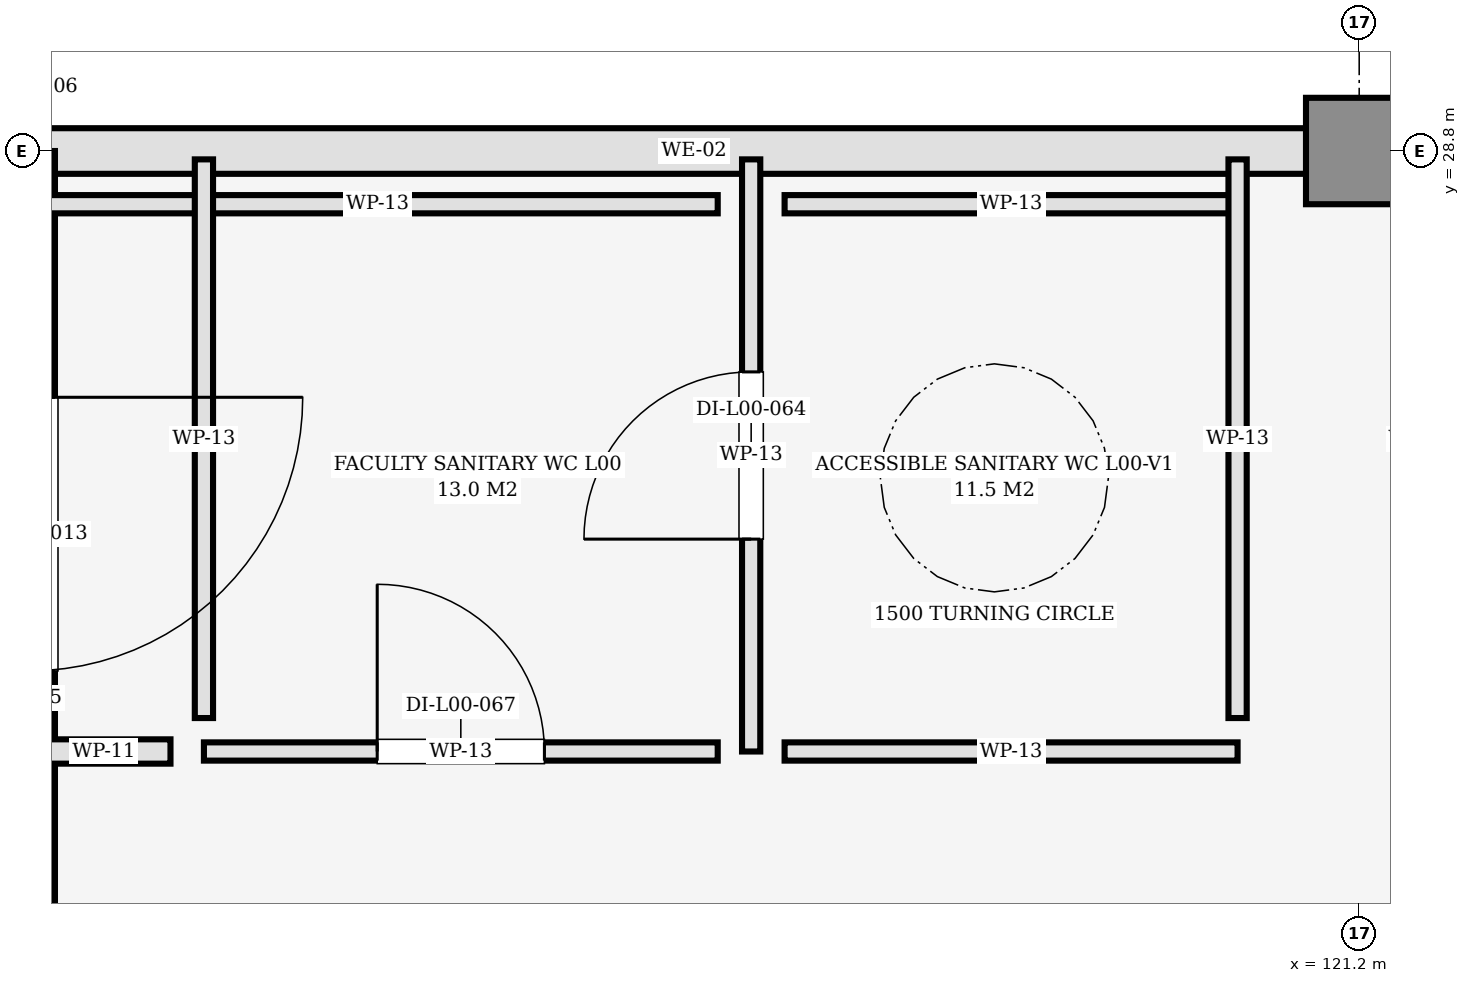
"""IFC4 building model, lengths in metres.
Left out: names, types, materials, properties, quantities, classifications, styles, units other than length and angle.
Written with IfcOpenShell. Run it as: python <this file> out.ifc"""

import sys

from ifc_helpers import new_model, si_unit, direction, frame, frame_2d, origin, origin_2d, place, context, subcontext, project, spatial, rectangle, extrude, element, fill, save


model = new_model("IFC4")
c1 = context("Model", 3, precision=1e-05, world=origin(), true_north=direction((0.0, 1.0)))
c2 = subcontext(c1, "Body", "Model", "MODEL_VIEW")
j1 = project(units=[si_unit("LENGTHUNIT", "METRE"), si_unit("PLANEANGLEUNIT", "RADIAN")], contexts=[c1])
p1 = place(None, origin())
s1 = spatial("IfcSite", under=j1, at=p1, CompositionType="ELEMENT")
p2 = place(p1, origin())
s2 = spatial("IfcBuilding", under=s1, at=p2, CompositionType="ELEMENT")
p3 = place(p2, origin())
s3 = spatial("IfcBuildingStorey", under=s2, at=p3, CompositionType="ELEMENT", Elevation=0.0)
p4 = place(p3, frame((121.2, 28.8, 0.0), z_axis=(0.0, 0.0, 1.0), x_axis=(1.0, 0.0, 0.0)))
e1 = element("IfcColumn", 1, at=p4, inside=s3, PredefinedType="COLUMN", context=c2, shape_type="SweptSolid", body=[
    extrude(rectangle(XDim=0.7, YDim=0.7, at=origin_2d()), origin(), (0.0, 0.0, 1.0), 4.8),
])
p5 = place(p3, frame((130.2, 28.8, 0.0), z_axis=(0.0, 0.0, 1.0), x_axis=(-1.0, 0.0, 0.0)))
e2 = element("IfcWall", 2, at=p5, inside=s3, PredefinedType="SOLIDWALL", context=c2, shape_type="SweptSolid", body=[
    extrude(rectangle(XDim=9.0, YDim=0.34, at=frame_2d((4.5, 0.0))), origin(), (0.0, 0.0, 1.0), 3.705),
])
p6 = place(p5, frame((3.5, 0.0, 0.0)))
e3 = element("IfcOpeningElement", 3, at=p6, cuts=e2, PredefinedType="OPENING", context=c2, shape_type="SweptSolid", body=[
    extrude(rectangle(XDim=2.0, YDim=2.3, at=frame_2d((1.0, 1.15))), frame((0.0, 0.18, 0.0), z_axis=(0.0, -1.0, 0.0), x_axis=(1.0, 0.0, 0.0)), (0.0, 0.0, 1.0), 0.36),
])
p7 = place(p3, frame((121.2, 28.8, 0.0), z_axis=(0.0, 0.0, 1.0), x_axis=(-1.0, 0.0, 0.0)))
e4 = element("IfcWall", 4, at=p7, inside=s3, PredefinedType="SOLIDWALL", context=c2, shape_type="SweptSolid", body=[
    extrude(rectangle(XDim=8.75, YDim=0.3, at=frame_2d((4.375, 0.0))), origin(), (0.0, 0.0, 1.0), 3.705),
])
p8 = place(p7, frame((2.292, 0.0, 0.9)))
e5 = element("IfcOpeningElement", 5, at=p8, cuts=e4, PredefinedType="OPENING", context=c2, shape_type="SweptSolid", body=[
    extrude(rectangle(XDim=1.25, YDim=1.5, at=frame_2d((0.625, 0.75))), frame((0.0, 0.16, 0.0), z_axis=(0.0, -1.0, 0.0), x_axis=(1.0, 0.0, 0.0)), (0.0, 0.0, 1.0), 0.32),
])
p9 = place(p7, frame((5.208, 0.0, 0.9)))
e6 = element("IfcOpeningElement", 6, at=p9, cuts=e4, PredefinedType="OPENING", context=c2, shape_type="SweptSolid", body=[
    extrude(rectangle(XDim=1.25, YDim=1.5, at=frame_2d((0.625, 0.75))), frame((0.0, 0.16, 0.0), z_axis=(0.0, -1.0, 0.0), x_axis=(1.0, 0.0, 0.0)), (0.0, 0.0, 1.0), 0.32),
])
p10 = place(p3, frame((112.45, 28.8, 0.0), z_axis=(0.0, 0.0, 1.0), x_axis=(0.0, -1.0, 0.0)))
e7 = element("IfcWall", 7, at=p10, inside=s3, PredefinedType="SOLIDWALL", context=c2, shape_type="SweptSolid", body=[
    extrude(rectangle(XDim=7.2, YDim=0.34, at=frame_2d((3.6, 0.0))), origin(), (0.0, 0.0, 1.0), 3.705),
])
p11 = place(p10, frame((1.62, 0.0, 0.0)))
e8 = element("IfcOpeningElement", 8, at=p11, cuts=e7, PredefinedType="OPENING", context=c2, shape_type="SweptSolid", body=[
    extrude(rectangle(XDim=1.8, YDim=2.2, at=frame_2d((0.9, 1.1))), frame((0.0, 0.18, 0.0), z_axis=(0.0, -1.0, 0.0), x_axis=(1.0, 0.0, 0.0)), (0.0, 0.0, 1.0), 0.36),
])
p12 = place(p3, frame((117.2, 24.85, 0.0), z_axis=(0.0, 0.0, 1.0), x_axis=(0.0, 1.0, 0.0)))
e9 = element("IfcWall", 9, at=p12, inside=s3, PredefinedType="PARTITIONING", context=c2, shape_type="SweptSolid", body=[
    extrude(rectangle(XDim=3.895, YDim=0.12, at=frame_2d((1.948, 0.0))), origin(), (0.0, 0.0, 1.0), 3.705),
])
p13 = place(p12, frame((1.397, 0.0, 0.0)))
e10 = element("IfcOpeningElement", 10, at=p13, cuts=e9, PredefinedType="OPENING", context=c2, shape_type="SweptSolid", body=[
    extrude(rectangle(XDim=1.1, YDim=2.15, at=frame_2d((0.55, 1.075))), frame((0.0, 0.07, 0.0), z_axis=(0.0, -1.0, 0.0), x_axis=(1.0, 0.0, 0.0)), (0.0, 0.0, 1.0), 0.14),
])
for number, where, z_axis, x_axis in (
    (11, (117.42, 24.85, 0.0), (0.0, 0.0, 1.0), (1.0, 0.0, 0.0)),
    (12, (117.42, 28.45, 0.0), (0.0, 0.0, 1.0), (1.0, 0.0, 0.0)),
):
    element("IfcWall", number, at=place(p3, frame(where, z_axis=z_axis, x_axis=x_axis)), inside=s3, PredefinedType="PARTITIONING", context=c2, shape_type="SweptSolid", body=[
        extrude(rectangle(XDim=2.98, YDim=0.12, at=frame_2d((1.49, 0.0))), origin(), (0.0, 0.0, 1.0), 4.52),
    ])
p14 = place(p3, frame((120.4, 25.07, 0.0), z_axis=(0.0, 0.0, 1.0), x_axis=(0.0, 1.0, 0.0)))
e13 = element("IfcWall", 13, at=p14, inside=s3, PredefinedType="PARTITIONING", context=c2, shape_type="SweptSolid", body=[
    extrude(rectangle(XDim=3.675, YDim=0.12, at=frame_2d((1.837, 0.0))), origin(), (0.0, 0.0, 1.0), 3.705),
])
p15 = place(p3, frame((112.505, 28.45, 0.0), z_axis=(0.0, 0.0, 1.0), x_axis=(1.0, 0.0, 0.0)))
e14 = element("IfcWall", 14, at=p15, inside=s3, PredefinedType="PARTITIONING", context=c2, shape_type="SweptSolid", body=[
    extrude(rectangle(XDim=4.475, YDim=0.12, at=frame_2d((2.238, 0.0))), origin(), (0.0, 0.0, 1.0), 4.52),
])
p16 = place(p3, frame((113.6, 24.85, 0.0), z_axis=(0.0, 0.0, 1.0), x_axis=(1.0, 0.0, 0.0)))
e15 = element("IfcWall", 15, at=p16, inside=s3, PredefinedType="PARTITIONING", context=c2, shape_type="SweptSolid", body=[
    extrude(rectangle(XDim=3.38, YDim=0.12, at=frame_2d((1.69, 0.0))), origin(), (0.0, 0.0, 1.0), 4.52),
])
p17 = place(p16, frame((1.14, 0.0, 0.0)))
e16 = element("IfcOpeningElement", 16, at=p17, cuts=e15, PredefinedType="OPENING", context=c2, shape_type="SweptSolid", body=[
    extrude(rectangle(XDim=1.1, YDim=2.15, at=frame_2d((0.55, 1.075))), frame((0.0, 0.07, 0.0), z_axis=(0.0, -1.0, 0.0), x_axis=(1.0, 0.0, 0.0)), (0.0, 0.0, 1.0), 0.14),
])
p18 = place(p3, frame((113.6, 25.07, 0.0), z_axis=(0.0, 0.0, 1.0), x_axis=(0.0, 1.0, 0.0)))
e17 = element("IfcWall", 17, at=p18, inside=s3, PredefinedType="PARTITIONING", context=c2, shape_type="SweptSolid", body=[
    extrude(rectangle(XDim=3.675, YDim=0.12, at=frame_2d((1.837, 0.0))), origin(), (0.0, 0.0, 1.0), 3.705),
])
p19 = place(p3, frame((112.505, 24.85, 0.0), z_axis=(0.0, 0.0, 1.0), x_axis=(1.0, 0.0, 0.0)))
e18 = element("IfcWall", 18, at=p19, inside=s3, PredefinedType="PARTITIONING", context=c2, shape_type="SweptSolid", body=[
    extrude(rectangle(XDim=0.875, YDim=0.16, at=frame_2d((0.438, 0.0))), origin(), (0.0, 0.0, 1.0), 4.52),
])
p20 = place(p8, origin())
e19 = element("IfcWindow", 19, at=p20, inside=s3, PartitioningType="DOUBLE_PANEL_VERTICAL", PredefinedType="WINDOW", context=c2, shape_type="SweptSolid", body=[
    extrude(rectangle(XDim=1.25, YDim=1.5, at=frame_2d((0.625, 0.75))), frame((0.0, 0.03, 0.0), z_axis=(0.0, -1.0, 0.0), x_axis=(1.0, 0.0, 0.0)), (0.0, 0.0, 1.0), 0.06),
])
fill(e5, e19)
p21 = place(p9, origin())
e20 = element("IfcWindow", 20, at=p21, inside=s3, PartitioningType="DOUBLE_PANEL_VERTICAL", PredefinedType="WINDOW", context=c2, shape_type="SweptSolid", body=[
    extrude(rectangle(XDim=1.25, YDim=1.5, at=frame_2d((0.625, 0.75))), frame((0.0, 0.03, 0.0), z_axis=(0.0, -1.0, 0.0), x_axis=(1.0, 0.0, 0.0)), (0.0, 0.0, 1.0), 0.06),
])
fill(e6, e20)
p22 = place(p13, origin())
e21 = element("IfcDoor", 21, at=p22, inside=s3, OperationType="SINGLE_SWING_LEFT", PredefinedType="DOOR", context=c2, shape_type="SweptSolid", body=[
    extrude(rectangle(XDim=1.1, YDim=2.15, at=frame_2d((0.55, 1.075))), frame((0.0, 0.025, 0.0), z_axis=(0.0, -1.0, 0.0), x_axis=(1.0, 0.0, 0.0)), (0.0, 0.0, 1.0), 0.05),
])
fill(e10, e21)
p23 = place(p17, origin())
e22 = element("IfcDoor", 22, at=p23, inside=s3, OperationType="SINGLE_SWING_LEFT", PredefinedType="DOOR", context=c2, shape_type="SweptSolid", body=[
    extrude(rectangle(XDim=1.1, YDim=2.15, at=frame_2d((0.55, 1.075))), frame((0.0, 0.025, 0.0), z_axis=(0.0, -1.0, 0.0), x_axis=(1.0, 0.0, 0.0)), (0.0, 0.0, 1.0), 0.05),
])
fill(e16, e22)
save(model, sys.argv[1])
